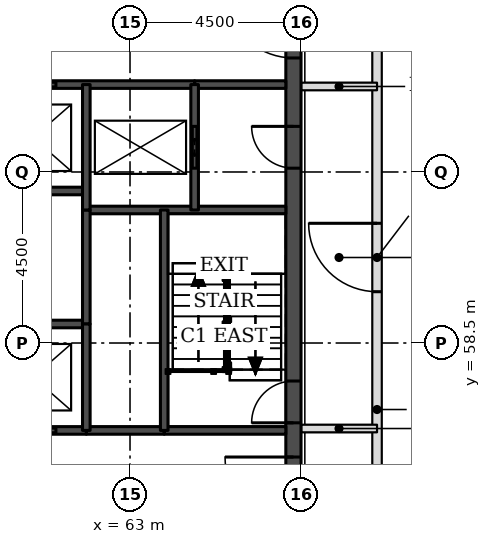
"""IFC4 building model, lengths in metres.
Left out: names, types, materials, properties, quantities, classifications, styles, units other than length and angle.
Written with IfcOpenShell. Run it as: python <this file> out.ifc"""

import sys

from ifc_helpers import new_model, si_unit, direction, frame, frame_2d, origin, place, context, subcontext, project, spatial, rectangle, extrude, element, fill, save


model = new_model("IFC4")
c1 = context("Model", 3, precision=1e-05, world=origin(), true_north=direction((0.0, 1.0)))
c2 = subcontext(c1, "Body", "Model", "MODEL_VIEW")
j1 = project(units=[si_unit("LENGTHUNIT", "METRE"), si_unit("PLANEANGLEUNIT", "RADIAN")], contexts=[c1])
p1 = place(None, origin())
s1 = spatial("IfcSite", under=j1, at=p1, CompositionType="ELEMENT")
p2 = place(p1, origin())
s2 = spatial("IfcBuilding", under=s1, at=p2, CompositionType="ELEMENT")
p3 = place(p2, frame((0.0, 0.0, 206.9)))
s3 = spatial("IfcBuildingStorey", under=s2, at=p3, CompositionType="ELEMENT", Elevation=206.9)
p4 = place(p3, frame((67.3, 49.5, 0.0), z_axis=(0.0, 0.0, 1.0), x_axis=(0.0, 1.0, 0.0)))
e1 = element("IfcWall", 1, at=p4, inside=s3, PredefinedType="SHEAR", context=c2, shape_type="SweptSolid", body=[
    extrude(rectangle(XDim=22.5, YDim=0.4, at=frame_2d((11.25, 0.0))), origin(), (0.0, 0.0, 1.0), 5.0),
])
p5 = place(p4, frame((4.2, 0.0, 0.0)))
e2 = element("IfcOpeningElement", 2, at=p5, cuts=e1, PredefinedType="OPENING", context=c2, shape_type="SweptSolid", body=[
    extrude(rectangle(XDim=1.8, YDim=2.1, at=frame_2d((0.9, 1.05))), frame((0.0, 0.21, 0.0), z_axis=(0.0, -1.0, 0.0), x_axis=(1.0, 0.0, 0.0)), (0.0, 0.0, 1.0), 0.42),
])
p6 = place(p4, frame((6.9, 0.0, 0.0)))
e3 = element("IfcOpeningElement", 3, at=p6, cuts=e1, PredefinedType="OPENING", context=c2, shape_type="SweptSolid", body=[
    extrude(rectangle(XDim=1.1, YDim=2.1, at=frame_2d((0.55, 1.05))), frame((0.0, 0.21, 0.0), z_axis=(0.0, -1.0, 0.0), x_axis=(1.0, 0.0, 0.0)), (0.0, 0.0, 1.0), 0.42),
])
p7 = place(p4, frame((13.6, 0.0, 0.0)))
e4 = element("IfcOpeningElement", 4, at=p7, cuts=e1, PredefinedType="OPENING", context=c2, shape_type="SweptSolid", body=[
    extrude(rectangle(XDim=1.1, YDim=2.1, at=frame_2d((0.55, 1.05))), frame((0.0, 0.21, 0.0), z_axis=(0.0, -1.0, 0.0), x_axis=(1.0, 0.0, 0.0)), (0.0, 0.0, 1.0), 0.42),
])
p8 = place(p4, frame((16.5, 0.0, 0.0)))
e5 = element("IfcOpeningElement", 5, at=p8, cuts=e1, PredefinedType="OPENING", context=c2, shape_type="SweptSolid", body=[
    extrude(rectangle(XDim=1.8, YDim=2.1, at=frame_2d((0.9, 1.05))), frame((0.0, 0.21, 0.0), z_axis=(0.0, -1.0, 0.0), x_axis=(1.0, 0.0, 0.0)), (0.0, 0.0, 1.0), 0.42),
])
p9 = place(p3, frame((69.5, 47.5, 0.0), z_axis=(0.0, 0.0, 1.0), x_axis=(0.0, 1.0, 0.0)))
e6 = element("IfcWall", 6, at=p9, inside=s3, PredefinedType="PARTITIONING", context=c2, shape_type="SweptSolid", body=[
    extrude(rectangle(XDim=26.5, YDim=0.25, at=frame_2d((13.25, 0.0))), origin(), (0.0, 0.0, 1.0), 4.85),
])
p10 = place(p9, frame((12.35, 0.0, 0.0)))
e7 = element("IfcOpeningElement", 7, at=p10, cuts=e6, PredefinedType="OPENING", context=c2, shape_type="SweptSolid", body=[
    extrude(rectangle(XDim=1.8, YDim=2.1, at=frame_2d((0.9, 1.05))), frame((0.0, 0.135, 0.0), z_axis=(0.0, -1.0, 0.0), x_axis=(1.0, 0.0, 0.0)), (0.0, 0.0, 1.0), 0.27),
])
for number, where, z_axis, x_axis in (
    (8, (67.5, 56.25, 0.0), (0.0, 0.0, 1.0), (1.0, 0.0, 0.0)),
    (9, (67.5, 65.25, 0.0), (0.0, 0.0, 1.0), (1.0, 0.0, 0.0)),
):
    element("IfcWall", number, at=place(p3, frame(where, z_axis=z_axis, x_axis=x_axis)), inside=s3, PredefinedType="PARTITIONING", context=c2, shape_type="SweptSolid", body=[
        extrude(rectangle(XDim=2.0, YDim=0.2, at=frame_2d((1.0, 0.0))), origin(), (0.0, 0.0, 1.0), 4.85),
    ])
p11 = place(p3, frame((61.85, 56.2, 0.0), z_axis=(0.0, 0.0, 1.0), x_axis=(1.0, 0.0, 0.0)))
e10 = element("IfcWall", 10, at=p11, inside=s3, PredefinedType="SOLIDWALL", context=c2, shape_type="SweptSolid", body=[
    extrude(rectangle(XDim=2.05, YDim=0.2, at=frame_2d((1.025, 0.0))), origin(), (0.0, 0.0, 1.0), 4.85),
])
p12 = place(p3, frame((50.65, 56.2, 0.0), z_axis=(0.0, 0.0, 1.0), x_axis=(1.0, 0.0, 0.0)))
e11 = element("IfcWall", 11, at=p12, inside=s3, PredefinedType="SOLIDWALL", context=c2, shape_type="SweptSolid", body=[
    extrude(rectangle(XDim=11.2, YDim=0.2, at=frame_2d((5.6, 0.0))), origin(), (0.0, 0.0, 1.0), 4.85),
])
p13 = place(p12, frame((0.8, 0.0, 0.0)))
e12 = element("IfcOpeningElement", 12, at=p13, cuts=e11, PredefinedType="OPENING", context=c2, shape_type="SweptSolid", body=[
    extrude(rectangle(XDim=1.2, YDim=2.1, at=frame_2d((0.6, 1.05))), frame((0.0, 0.11, 0.0), z_axis=(0.0, -1.0, 0.0), x_axis=(1.0, 0.0, 0.0)), (0.0, 0.0, 1.0), 0.22),
])
p14 = place(p12, frame((3.6, 0.0, 0.0)))
e13 = element("IfcOpeningElement", 13, at=p14, cuts=e11, PredefinedType="OPENING", context=c2, shape_type="SweptSolid", body=[
    extrude(rectangle(XDim=1.2, YDim=2.1, at=frame_2d((0.6, 1.05))), frame((0.0, 0.11, 0.0), z_axis=(0.0, -1.0, 0.0), x_axis=(1.0, 0.0, 0.0)), (0.0, 0.0, 1.0), 0.22),
])
p15 = place(p12, frame((6.4, 0.0, 0.0)))
e14 = element("IfcOpeningElement", 14, at=p15, cuts=e11, PredefinedType="OPENING", context=c2, shape_type="SweptSolid", body=[
    extrude(rectangle(XDim=1.2, YDim=2.1, at=frame_2d((0.6, 1.05))), frame((0.0, 0.11, 0.0), z_axis=(0.0, -1.0, 0.0), x_axis=(1.0, 0.0, 0.0)), (0.0, 0.0, 1.0), 0.22),
])
p16 = place(p12, frame((9.2, 0.0, 0.0)))
e15 = element("IfcOpeningElement", 15, at=p16, cuts=e11, PredefinedType="OPENING", context=c2, shape_type="SweptSolid", body=[
    extrude(rectangle(XDim=1.2, YDim=2.1, at=frame_2d((0.6, 1.05))), frame((0.0, 0.11, 0.0), z_axis=(0.0, -1.0, 0.0), x_axis=(1.0, 0.0, 0.0)), (0.0, 0.0, 1.0), 0.22),
])
p17 = place(p3, frame((63.9, 56.2, 0.0), z_axis=(0.0, 0.0, 1.0), x_axis=(1.0, 0.0, 0.0)))
e16 = element("IfcWall", 16, at=p17, inside=s3, PredefinedType="SOLIDWALL", context=c2, shape_type="SweptSolid", body=[
    extrude(rectangle(XDim=3.2, YDim=0.2, at=frame_2d((1.6, 0.0))), origin(), (0.0, 0.0, 1.0), 4.85),
])
p18 = place(p3, frame((50.65, 59.0, 0.0), z_axis=(0.0, 0.0, 1.0), x_axis=(1.0, 0.0, 0.0)))
e17 = element("IfcWall", 17, at=p18, inside=s3, PredefinedType="SOLIDWALL", context=c2, shape_type="SweptSolid", body=[
    extrude(rectangle(XDim=11.2, YDim=0.2, at=frame_2d((5.6, 0.0))), origin(), (0.0, 0.0, 1.0), 5.0),
])
p19 = place(p3, frame((61.85, 62.0, 0.0), z_axis=(0.0, 0.0, 1.0), x_axis=(1.0, 0.0, 0.0)))
e18 = element("IfcWall", 18, at=p19, inside=s3, PredefinedType="SOLIDWALL", context=c2, shape_type="SweptSolid", body=[
    extrude(rectangle(XDim=5.25, YDim=0.2, at=frame_2d((2.625, 0.0))), origin(), (0.0, 0.0, 1.0), 4.85),
])
p20 = place(p3, frame((50.65, 62.5, 0.0), z_axis=(0.0, 0.0, 1.0), x_axis=(1.0, 0.0, 0.0)))
e19 = element("IfcWall", 19, at=p20, inside=s3, PredefinedType="SOLIDWALL", context=c2, shape_type="SweptSolid", body=[
    extrude(rectangle(XDim=11.2, YDim=0.2, at=frame_2d((5.6, 0.0))), origin(), (0.0, 0.0, 1.0), 5.0),
])
p21 = place(p3, frame((64.7, 65.3, 0.0), z_axis=(0.0, 0.0, 1.0), x_axis=(1.0, 0.0, 0.0)))
e20 = element("IfcWall", 20, at=p21, inside=s3, PredefinedType="SOLIDWALL", context=c2, shape_type="SweptSolid", body=[
    extrude(rectangle(XDim=2.4, YDim=0.2, at=frame_2d((1.2, 0.0))), origin(), (0.0, 0.0, 1.0), 4.85),
])
p22 = place(p3, frame((47.8, 65.3, 0.0), z_axis=(0.0, 0.0, 1.0), x_axis=(1.0, 0.0, 0.0)))
e21 = element("IfcWall", 21, at=p22, inside=s3, PredefinedType="SOLIDWALL", context=c2, shape_type="SweptSolid", body=[
    extrude(rectangle(XDim=16.9, YDim=0.2, at=frame_2d((8.45, 0.0))), origin(), (0.0, 0.0, 1.0), 4.85),
])
p23 = place(p22, frame((3.65, 0.0, 0.0)))
e22 = element("IfcOpeningElement", 22, at=p23, cuts=e21, PredefinedType="OPENING", context=c2, shape_type="SweptSolid", body=[
    extrude(rectangle(XDim=1.2, YDim=2.1, at=frame_2d((0.6, 1.05))), frame((0.0, 0.11, 0.0), z_axis=(0.0, -1.0, 0.0), x_axis=(1.0, 0.0, 0.0)), (0.0, 0.0, 1.0), 0.22),
])
p24 = place(p22, frame((6.45, 0.0, 0.0)))
e23 = element("IfcOpeningElement", 23, at=p24, cuts=e21, PredefinedType="OPENING", context=c2, shape_type="SweptSolid", body=[
    extrude(rectangle(XDim=1.2, YDim=2.1, at=frame_2d((0.6, 1.05))), frame((0.0, 0.11, 0.0), z_axis=(0.0, -1.0, 0.0), x_axis=(1.0, 0.0, 0.0)), (0.0, 0.0, 1.0), 0.22),
])
p25 = place(p22, frame((9.25, 0.0, 0.0)))
e24 = element("IfcOpeningElement", 24, at=p25, cuts=e21, PredefinedType="OPENING", context=c2, shape_type="SweptSolid", body=[
    extrude(rectangle(XDim=1.2, YDim=2.1, at=frame_2d((0.6, 1.05))), frame((0.0, 0.11, 0.0), z_axis=(0.0, -1.0, 0.0), x_axis=(1.0, 0.0, 0.0)), (0.0, 0.0, 1.0), 0.22),
])
p26 = place(p22, frame((12.05, 0.0, 0.0)))
e25 = element("IfcOpeningElement", 25, at=p26, cuts=e21, PredefinedType="OPENING", context=c2, shape_type="SweptSolid", body=[
    extrude(rectangle(XDim=1.2, YDim=2.1, at=frame_2d((0.6, 1.05))), frame((0.0, 0.11, 0.0), z_axis=(0.0, -1.0, 0.0), x_axis=(1.0, 0.0, 0.0)), (0.0, 0.0, 1.0), 0.22),
])
p27 = place(p3, frame((61.85, 59.0, 0.0), z_axis=(0.0, 0.0, 1.0), x_axis=(0.0, 1.0, 0.0)))
e26 = element("IfcWall", 26, at=p27, inside=s3, PredefinedType="SOLIDWALL", context=c2, shape_type="SweptSolid", body=[
    extrude(rectangle(XDim=3.0, YDim=0.2, at=frame_2d((1.5, 0.0))), origin(), (0.0, 0.0, 1.0), 5.0),
])
p28 = place(p3, frame((61.85, 56.2, 0.0), z_axis=(0.0, 0.0, 1.0), x_axis=(0.0, 1.0, 0.0)))
e27 = element("IfcWall", 27, at=p28, inside=s3, PredefinedType="SOLIDWALL", context=c2, shape_type="SweptSolid", body=[
    extrude(rectangle(XDim=2.8, YDim=0.2, at=frame_2d((1.4, 0.0))), origin(), (0.0, 0.0, 1.0), 4.85),
])
p29 = place(p3, frame((61.85, 62.0, 0.0), z_axis=(0.0, 0.0, 1.0), x_axis=(0.0, 1.0, 0.0)))
e28 = element("IfcWall", 28, at=p29, inside=s3, PredefinedType="SOLIDWALL", context=c2, shape_type="SweptSolid", body=[
    extrude(rectangle(XDim=3.3, YDim=0.2, at=frame_2d((1.65, 0.0))), origin(), (0.0, 0.0, 1.0), 4.85),
])
p30 = place(p3, frame((63.9, 56.2, 0.0), z_axis=(0.0, 0.0, 1.0), x_axis=(0.0, 1.0, 0.0)))
e29 = element("IfcWall", 29, at=p30, inside=s3, PredefinedType="SOLIDWALL", context=c2, shape_type="SweptSolid", body=[
    extrude(rectangle(XDim=5.8, YDim=0.2, at=frame_2d((2.9, 0.0))), origin(), (0.0, 0.0, 1.0), 4.85),
])
p31 = place(p3, frame((64.7, 62.0, 0.0), z_axis=(0.0, 0.0, 1.0), x_axis=(0.0, 1.0, 0.0)))
e30 = element("IfcWall", 30, at=p31, inside=s3, PredefinedType="SOLIDWALL", context=c2, shape_type="SweptSolid", body=[
    extrude(rectangle(XDim=3.3, YDim=0.2, at=frame_2d((1.65, 0.0))), origin(), (0.0, 0.0, 1.0), 4.85),
])
p32 = place(p31, frame((1.1, 0.0, 0.0)))
e31 = element("IfcOpeningElement", 31, at=p32, cuts=e30, PredefinedType="OPENING", context=c2, shape_type="SweptSolid", body=[
    extrude(rectangle(XDim=1.1, YDim=2.1, at=frame_2d((0.55, 1.05))), frame((0.0, 0.11, 0.0), z_axis=(0.0, -1.0, 0.0), x_axis=(1.0, 0.0, 0.0)), (0.0, 0.0, 1.0), 0.22),
])
p33 = place(p10, origin())
e32 = element("IfcDoor", 32, at=p33, inside=s3, OperationType="SINGLE_SWING_RIGHT", PredefinedType="DOOR", context=c2, shape_type="SweptSolid", body=[
    extrude(rectangle(XDim=1.8, YDim=2.1, at=frame_2d((0.9, 1.05))), frame((0.0, 0.025, 0.0), z_axis=(0.0, -1.0, 0.0), x_axis=(1.0, 0.0, 0.0)), (0.0, 0.0, 1.0), 0.05),
])
fill(e7, e32)
p34 = place(p16, origin())
e33 = element("IfcDoor", 33, at=p34, inside=s3, OperationType="DOUBLE_DOOR_SLIDING", PredefinedType="DOOR", context=c2, shape_type="SweptSolid", body=[
    extrude(rectangle(XDim=1.2, YDim=2.1, at=frame_2d((0.6, 1.05))), frame((0.0, 0.025, 0.0), z_axis=(0.0, -1.0, 0.0), x_axis=(1.0, 0.0, 0.0)), (0.0, 0.0, 1.0), 0.05),
])
fill(e15, e33)
p35 = place(p26, origin())
e34 = element("IfcDoor", 34, at=p35, inside=s3, OperationType="DOUBLE_DOOR_SLIDING", PredefinedType="DOOR", context=c2, shape_type="SweptSolid", body=[
    extrude(rectangle(XDim=1.2, YDim=2.1, at=frame_2d((0.6, 1.05))), frame((0.0, 0.025, 0.0), z_axis=(0.0, -1.0, 0.0), x_axis=(1.0, 0.0, 0.0)), (0.0, 0.0, 1.0), 0.05),
])
fill(e25, e34)
p36 = place(p32, origin())
e35 = element("IfcDoor", 35, at=p36, inside=s3, OperationType="DOUBLE_DOOR_SLIDING", PredefinedType="DOOR", context=c2, shape_type="SweptSolid", body=[
    extrude(rectangle(XDim=1.1, YDim=2.1, at=frame_2d((0.55, 1.05))), frame((0.0, 0.025, 0.0), z_axis=(0.0, -1.0, 0.0), x_axis=(1.0, 0.0, 0.0)), (0.0, 0.0, 1.0), 0.05),
])
fill(e31, e35)
p37 = place(p5, origin())
e36 = element("IfcDoor", 36, at=p37, inside=s3, OperationType="SINGLE_SWING_RIGHT", PredefinedType="DOOR", context=c2, shape_type="SweptSolid", body=[
    extrude(rectangle(XDim=1.8, YDim=2.1, at=frame_2d((0.9, 1.05))), frame((0.0, 0.025, 0.0), z_axis=(0.0, -1.0, 0.0), x_axis=(1.0, 0.0, 0.0)), (0.0, 0.0, 1.0), 0.05),
])
fill(e2, e36)
p38 = place(p6, origin())
e37 = element("IfcDoor", 37, at=p38, inside=s3, OperationType="SINGLE_SWING_LEFT", PredefinedType="DOOR", context=c2, shape_type="SweptSolid", body=[
    extrude(rectangle(XDim=1.1, YDim=2.1, at=frame_2d((0.55, 1.05))), frame((0.0, 0.025, 0.0), z_axis=(0.0, -1.0, 0.0), x_axis=(1.0, 0.0, 0.0)), (0.0, 0.0, 1.0), 0.05),
])
fill(e3, e37)
p39 = place(p7, origin())
e38 = element("IfcDoor", 38, at=p39, inside=s3, OperationType="SINGLE_SWING_RIGHT", PredefinedType="DOOR", context=c2, shape_type="SweptSolid", body=[
    extrude(rectangle(XDim=1.1, YDim=2.1, at=frame_2d((0.55, 1.05))), frame((0.0, 0.025, 0.0), z_axis=(0.0, -1.0, 0.0), x_axis=(1.0, 0.0, 0.0)), (0.0, 0.0, 1.0), 0.05),
])
fill(e4, e38)
p40 = place(p8, origin())
e39 = element("IfcDoor", 39, at=p40, inside=s3, OperationType="SINGLE_SWING_RIGHT", PredefinedType="DOOR", context=c2, shape_type="SweptSolid", body=[
    extrude(rectangle(XDim=1.8, YDim=2.1, at=frame_2d((0.9, 1.05))), frame((0.0, 0.025, 0.0), z_axis=(0.0, -1.0, 0.0), x_axis=(1.0, 0.0, 0.0)), (0.0, 0.0, 1.0), 0.05),
])
fill(e5, e39)
save(model, sys.argv[1])
